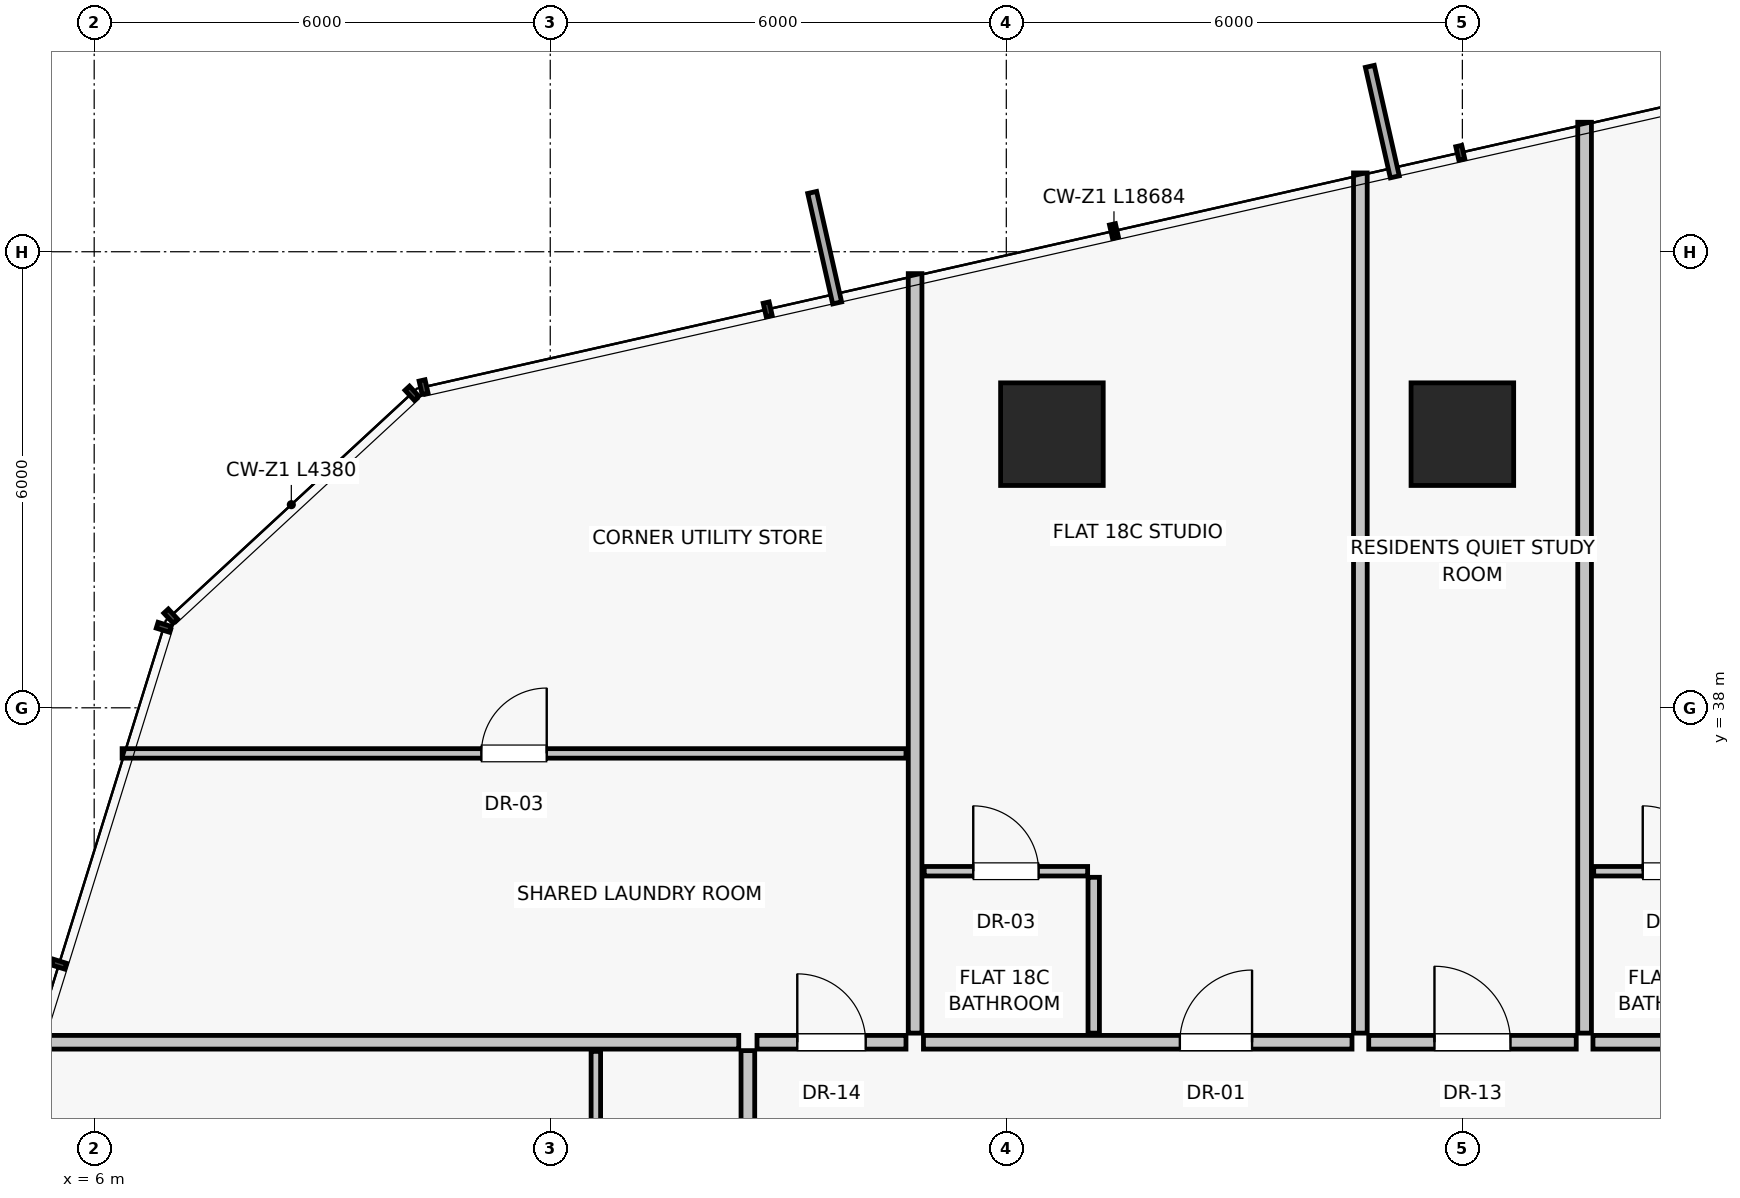
"""IFC4 building model, lengths in metres.
Left out: names, types, materials, properties, quantities, classifications, styles, units other than length and angle.
Written with IfcOpenShell. Run it as: python <this file> out.ifc"""

import sys

from ifc_helpers import new_model, si_unit, direction, frame, frame_2d, origin, origin_2d, place, context, subcontext, project, spatial, rectangle, extrude, source, transform, mapped, element, fill, save


model = new_model("IFC4")
c1 = context("Model", 3, precision=1e-05, world=origin(), true_north=direction((0.0, 1.0)))
c2 = subcontext(c1, "Body", "Model", "MODEL_VIEW")
j1 = project(units=[si_unit("LENGTHUNIT", "METRE"), si_unit("PLANEANGLEUNIT", "RADIAN")], contexts=[c1])
p1 = place(None, origin())
s1 = spatial("IfcSite", under=j1, at=p1, CompositionType="ELEMENT")
p2 = place(p1, origin())
s2 = spatial("IfcBuilding", under=s1, at=p2, CompositionType="ELEMENT")
p3 = place(p2, frame((0.0, 0.0, 67.35)))
s3 = spatial("IfcBuildingStorey", under=s2, at=p3, CompositionType="ELEMENT", Elevation=67.35)
for number, where, z_axis, x_axis in (
    (1, (24.0, 41.6, 0.0), (0.0, 0.0, 1.0), (1.0, 0.0, 0.0)),
    (2, (18.6, 41.6, 0.0), (0.0, 0.0, 1.0), (1.0, 0.0, 0.0)),
):
    element("IfcColumn", number, at=place(p3, frame(where, z_axis=z_axis, x_axis=x_axis)), inside=s3, PredefinedType="COLUMN", context=c2, shape_type="SweptSolid", body=[
        extrude(rectangle(XDim=1.35, YDim=1.35, at=origin_2d()), origin(), (0.0, 0.0, 1.0), 3.25),
    ])
p4 = place(p3, frame((16.8, 33.72, 0.0), z_axis=(0.0, 0.0, 1.0), x_axis=(0.0, 1.0, 0.0)))
e3 = element("IfcWall", 3, at=p4, inside=s3, PredefinedType="PARTITIONING", context=c2, shape_type="SweptSolid", body=[
    extrude(rectangle(XDim=9.992, YDim=0.18, at=frame_2d((4.996, 0.0))), origin(), (0.0, 0.0, 1.0), 3.0),
])
p5 = place(p3, frame((22.768, 33.6, 0.0), z_axis=(0.0, 0.0, 1.0), x_axis=(1.0, 0.0, 0.0)))
e4 = element("IfcWall", 4, at=p5, inside=s3, PredefinedType="PARTITIONING", context=c2, shape_type="SweptSolid", body=[
    extrude(rectangle(XDim=2.73, YDim=0.18, at=frame_2d((1.365, 0.0))), origin(), (0.0, 0.0, 1.0), 3.0),
])
p6 = place(p5, frame((0.865, 0.0, 0.0)))
e5 = element("IfcOpeningElement", 5, at=p6, cuts=e4, PredefinedType="OPENING", context=c2, shape_type="SweptSolid", body=[
    extrude(rectangle(XDim=1.0, YDim=2.01, at=frame_2d((0.5, 1.005))), frame((0.0, 0.1, 0.0), z_axis=(0.0, -1.0, 0.0), x_axis=(1.0, 0.0, 0.0)), (0.0, 0.0, 1.0), 0.2),
])
p7 = place(p3, frame((22.658, 33.72, 0.0), z_axis=(0.0, 0.0, 1.0), x_axis=(0.0, 1.0, 0.0)))
e6 = element("IfcWall", 6, at=p7, inside=s3, PredefinedType="PARTITIONING", context=c2, shape_type="SweptSolid", body=[
    extrude(rectangle(XDim=11.317, YDim=0.18, at=frame_2d((5.658, 0.0))), origin(), (0.0, 0.0, 1.0), 3.0),
])
p8 = place(p3, frame((16.91, 33.6, 0.0), z_axis=(0.0, 0.0, 1.0), x_axis=(1.0, 0.0, 0.0)))
e7 = element("IfcWall", 7, at=p8, inside=s3, PredefinedType="PARTITIONING", context=c2, shape_type="SweptSolid", body=[
    extrude(rectangle(XDim=5.638, YDim=0.18, at=frame_2d((2.819, 0.0))), origin(), (0.0, 0.0, 1.0), 3.0),
])
p9 = place(p8, frame((3.373, 0.0, 0.0)))
e8 = element("IfcOpeningElement", 8, at=p9, cuts=e7, PredefinedType="OPENING", context=c2, shape_type="SweptSolid", body=[
    extrude(rectangle(XDim=0.95, YDim=2.02, at=frame_2d((0.475, 1.01))), frame((0.0, 0.1, 0.0), z_axis=(0.0, -1.0, 0.0), x_axis=(1.0, 0.0, 0.0)), (0.0, 0.0, 1.0), 0.2),
])
p10 = place(p3, frame((19.15, 33.72, 0.0), z_axis=(0.0, 0.0, 1.0), x_axis=(0.0, 1.0, 0.0)))
e9 = element("IfcWall", 9, at=p10, inside=s3, PredefinedType="PARTITIONING", context=c2, shape_type="SweptSolid", body=[
    extrude(rectangle(XDim=2.05, YDim=0.15, at=frame_2d((1.025, 0.0))), origin(), (0.0, 0.0, 1.0), 3.0),
])
p11 = place(p3, frame((16.92, 35.85, 0.0), z_axis=(0.0, 0.0, 1.0), x_axis=(1.0, 0.0, 0.0)))
e10 = element("IfcWall", 10, at=p11, inside=s3, PredefinedType="PARTITIONING", context=c2, shape_type="SweptSolid", body=[
    extrude(rectangle(XDim=2.15, YDim=0.125, at=frame_2d((1.075, 0.0))), origin(), (0.0, 0.0, 1.0), 3.0),
])
p12 = place(p11, frame((0.645, 0.0, 0.0)))
e11 = element("IfcOpeningElement", 11, at=p12, cuts=e10, PredefinedType="OPENING", context=c2, shape_type="SweptSolid", body=[
    extrude(rectangle(XDim=0.86, YDim=2.01, at=frame_2d((0.43, 1.005))), frame((0.0, 0.073, 0.0), z_axis=(0.0, -1.0, 0.0), x_axis=(1.0, 0.0, 0.0)), (0.0, 0.0, 1.0), 0.145),
])
p13 = place(p3, frame((25.608, 33.72, 0.0), z_axis=(0.0, 0.0, 1.0), x_axis=(0.0, 1.0, 0.0)))
e12 = element("IfcWall", 12, at=p13, inside=s3, PredefinedType="PARTITIONING", context=c2, shape_type="SweptSolid", body=[
    extrude(rectangle(XDim=11.984, YDim=0.18, at=frame_2d((5.992, 0.0))), origin(), (0.0, 0.0, 1.0), 3.0),
])
p14 = place(p3, frame((25.718, 33.6, 0.0), z_axis=(0.0, 0.0, 1.0), x_axis=(1.0, 0.0, 0.0)))
e13 = element("IfcWall", 13, at=p14, inside=s3, PredefinedType="PARTITIONING", context=c2, shape_type="SweptSolid", body=[
    extrude(rectangle(XDim=5.372, YDim=0.18, at=frame_2d((2.686, 0.0))), origin(), (0.0, 0.0, 1.0), 3.0),
])
p15 = place(p14, frame((3.176, 0.0, 0.0)))
e14 = element("IfcOpeningElement", 14, at=p15, cuts=e13, PredefinedType="OPENING", context=c2, shape_type="SweptSolid", body=[
    extrude(rectangle(XDim=0.95, YDim=2.02, at=frame_2d((0.475, 1.01))), frame((0.0, 0.1, 0.0), z_axis=(0.0, -1.0, 0.0), x_axis=(1.0, 0.0, 0.0)), (0.0, 0.0, 1.0), 0.2),
])
p16 = place(p3, frame((25.728, 35.85, 0.0), z_axis=(0.0, 0.0, 1.0), x_axis=(1.0, 0.0, 0.0)))
e15 = element("IfcWall", 15, at=p16, inside=s3, PredefinedType="PARTITIONING", context=c2, shape_type="SweptSolid", body=[
    extrude(rectangle(XDim=2.15, YDim=0.125, at=frame_2d((1.075, 0.0))), origin(), (0.0, 0.0, 1.0), 3.0),
])
p17 = place(p16, frame((0.645, 0.0, 0.0)))
e16 = element("IfcOpeningElement", 16, at=p17, cuts=e15, PredefinedType="OPENING", context=c2, shape_type="SweptSolid", body=[
    extrude(rectangle(XDim=0.86, YDim=2.01, at=frame_2d((0.43, 1.005))), frame((0.0, 0.073, 0.0), z_axis=(0.0, -1.0, 0.0), x_axis=(1.0, 0.0, 0.0)), (0.0, 0.0, 1.0), 0.145),
])
p18 = place(p3, frame((14.48, 33.6, 0.0), z_axis=(0.0, 0.0, 1.0), x_axis=(-1.0, 0.0, 0.0)))
e17 = element("IfcWall", 17, at=p18, inside=s3, PredefinedType="PARTITIONING", context=c2, shape_type="SweptSolid", body=[
    extrude(rectangle(XDim=9.293, YDim=0.18, at=frame_2d((4.647, 0.0))), origin(), (0.0, 0.0, 1.0), 3.0),
])
p19 = place(p3, frame((14.6, 25.968, 0.0), z_axis=(0.0, 0.0, 1.0), x_axis=(0.0, 1.0, 0.0)))
e18 = element("IfcWall", 18, at=p19, inside=s3, PredefinedType="PARTITIONING", context=c2, shape_type="SweptSolid", body=[
    extrude(rectangle(XDim=7.522, YDim=0.18, at=frame_2d((3.761, 0.0))), origin(), (0.0, 0.0, 1.0), 3.0),
])
p20 = place(p19, frame((2.64, 0.0, 0.0)))
e19 = element("IfcOpeningElement", 19, at=p20, cuts=e18, PredefinedType="OPENING", context=c2, shape_type="SweptSolid", body=[
    extrude(rectangle(XDim=0.95, YDim=2.02, at=frame_2d((0.475, 1.01))), frame((0.0, 0.1, 0.0), z_axis=(0.0, -1.0, 0.0), x_axis=(1.0, 0.0, 0.0)), (0.0, 0.0, 1.0), 0.2),
])
p21 = place(p3, frame((12.6, 30.158, 0.0), z_axis=(0.0, 0.0, 1.0), x_axis=(0.0, 1.0, 0.0)))
e20 = element("IfcWall", 20, at=p21, inside=s3, PredefinedType="PARTITIONING", context=c2, shape_type="SweptSolid", body=[
    extrude(rectangle(XDim=3.322, YDim=0.125, at=frame_2d((1.661, 0.0))), origin(), (0.0, 0.0, 1.0), 3.0),
])
p22 = place(p3, frame((14.72, 33.6, 0.0), z_axis=(0.0, 0.0, 1.0), x_axis=(1.0, 0.0, 0.0)))
e21 = element("IfcWall", 21, at=p22, inside=s3, PredefinedType="PARTITIONING", context=c2, shape_type="SweptSolid", body=[
    extrude(rectangle(XDim=1.96, YDim=0.18, at=frame_2d((0.98, 0.0))), origin(), (0.0, 0.0, 1.0), 3.0),
])
p23 = place(p22, frame((0.53, 0.0, 0.0)))
e22 = element("IfcOpeningElement", 22, at=p23, cuts=e21, PredefinedType="OPENING", context=c2, shape_type="SweptSolid", body=[
    extrude(rectangle(XDim=0.9, YDim=2.01, at=frame_2d((0.45, 1.005))), frame((0.0, 0.1, 0.0), z_axis=(0.0, -1.0, 0.0), x_axis=(1.0, 0.0, 0.0)), (0.0, 0.0, 1.0), 0.2),
])
p24 = place(p3, frame((6.367, 37.4, 0.0), z_axis=(0.0, 0.0, 1.0), x_axis=(1.0, 0.0, 0.0)))
e23 = element("IfcWall", 23, at=p24, inside=s3, PredefinedType="PARTITIONING", context=c2, shape_type="SweptSolid", body=[
    extrude(rectangle(XDim=10.313, YDim=0.125, at=frame_2d((5.156, 0.0))), origin(), (0.0, 0.0, 1.0), 3.0),
])
p25 = place(p24, frame((4.726, 0.0, 0.0)))
e24 = element("IfcOpeningElement", 24, at=p25, cuts=e23, PredefinedType="OPENING", context=c2, shape_type="SweptSolid", body=[
    extrude(rectangle(XDim=0.86, YDim=2.01, at=frame_2d((0.43, 1.005))), frame((0.0, 0.073, 0.0), z_axis=(0.0, -1.0, 0.0), x_axis=(1.0, 0.0, 0.0)), (0.0, 0.0, 1.0), 0.145),
])
m1 = source(origin(), c2, "Body", "SweptSolid", [
    extrude(rectangle(XDim=1.0, YDim=2.01, at=frame_2d((0.5, 1.005))), frame((0.0, 0.025, 0.0), z_axis=(0.0, -1.0, 0.0), x_axis=(1.0, 0.0, 0.0)), (0.0, 0.0, 1.0), 0.05),
])
p26 = place(p6, origin())
e25 = element("IfcDoor", 25, at=p26, inside=s3, OperationType="SINGLE_SWING_LEFT", PredefinedType="DOOR", context=c2, shape_type="MappedRepresentation", body=[
    mapped(m1, transform((0.0, 0.0, 0.0), scale=1.0)),
])
fill(e5, e25)
m2 = source(origin(), c2, "Body", "SweptSolid", [
    extrude(rectangle(XDim=0.95, YDim=2.02, at=frame_2d((0.475, 1.01))), frame((0.0, 0.025, 0.0), z_axis=(0.0, -1.0, 0.0), x_axis=(1.0, 0.0, 0.0)), (0.0, 0.0, 1.0), 0.05),
])
p27 = place(p9, origin())
e26 = element("IfcDoor", 26, at=p27, inside=s3, OperationType="SINGLE_SWING_RIGHT", PredefinedType="DOOR", context=c2, shape_type="MappedRepresentation", body=[
    mapped(m2, transform((0.0, 0.0, 0.0), scale=1.0)),
])
fill(e8, e26)
m3 = source(origin(), c2, "Body", "SweptSolid", [
    extrude(rectangle(XDim=0.86, YDim=2.01, at=frame_2d((0.43, 1.005))), frame((0.0, 0.025, 0.0), z_axis=(0.0, -1.0, 0.0), x_axis=(1.0, 0.0, 0.0)), (0.0, 0.0, 1.0), 0.05),
])
p28 = place(p12, origin())
e27 = element("IfcDoor", 27, at=p28, inside=s3, OperationType="SINGLE_SWING_LEFT", PredefinedType="DOOR", context=c2, shape_type="MappedRepresentation", body=[
    mapped(m3, transform((0.0, 0.0, 0.0), scale=1.0)),
])
fill(e11, e27)
p29 = place(p17, origin())
e28 = element("IfcDoor", 28, at=p29, inside=s3, OperationType="SINGLE_SWING_LEFT", PredefinedType="DOOR", context=c2, shape_type="MappedRepresentation", body=[
    mapped(m3, transform((0.0, 0.0, 0.0), scale=1.0)),
])
fill(e16, e28)
m4 = source(origin(), c2, "Body", "SweptSolid", [
    extrude(rectangle(XDim=0.9, YDim=2.01, at=frame_2d((0.45, 1.005))), frame((0.0, 0.025, 0.0), z_axis=(0.0, -1.0, 0.0), x_axis=(1.0, 0.0, 0.0)), (0.0, 0.0, 1.0), 0.05),
])
p30 = place(p23, origin())
e29 = element("IfcDoor", 29, at=p30, inside=s3, OperationType="SINGLE_SWING_LEFT", PredefinedType="DOOR", context=c2, shape_type="MappedRepresentation", body=[
    mapped(m4, transform((0.0, 0.0, 0.0), scale=1.0)),
])
fill(e22, e29)
p31 = place(p25, origin())
e30 = element("IfcDoor", 30, at=p31, inside=s3, OperationType="SINGLE_SWING_RIGHT", PredefinedType="DOOR", context=c2, shape_type="MappedRepresentation", body=[
    mapped(m3, transform((0.0, 0.0, 0.0), scale=1.0)),
])
fill(e24, e30)
save(model, sys.argv[1])
